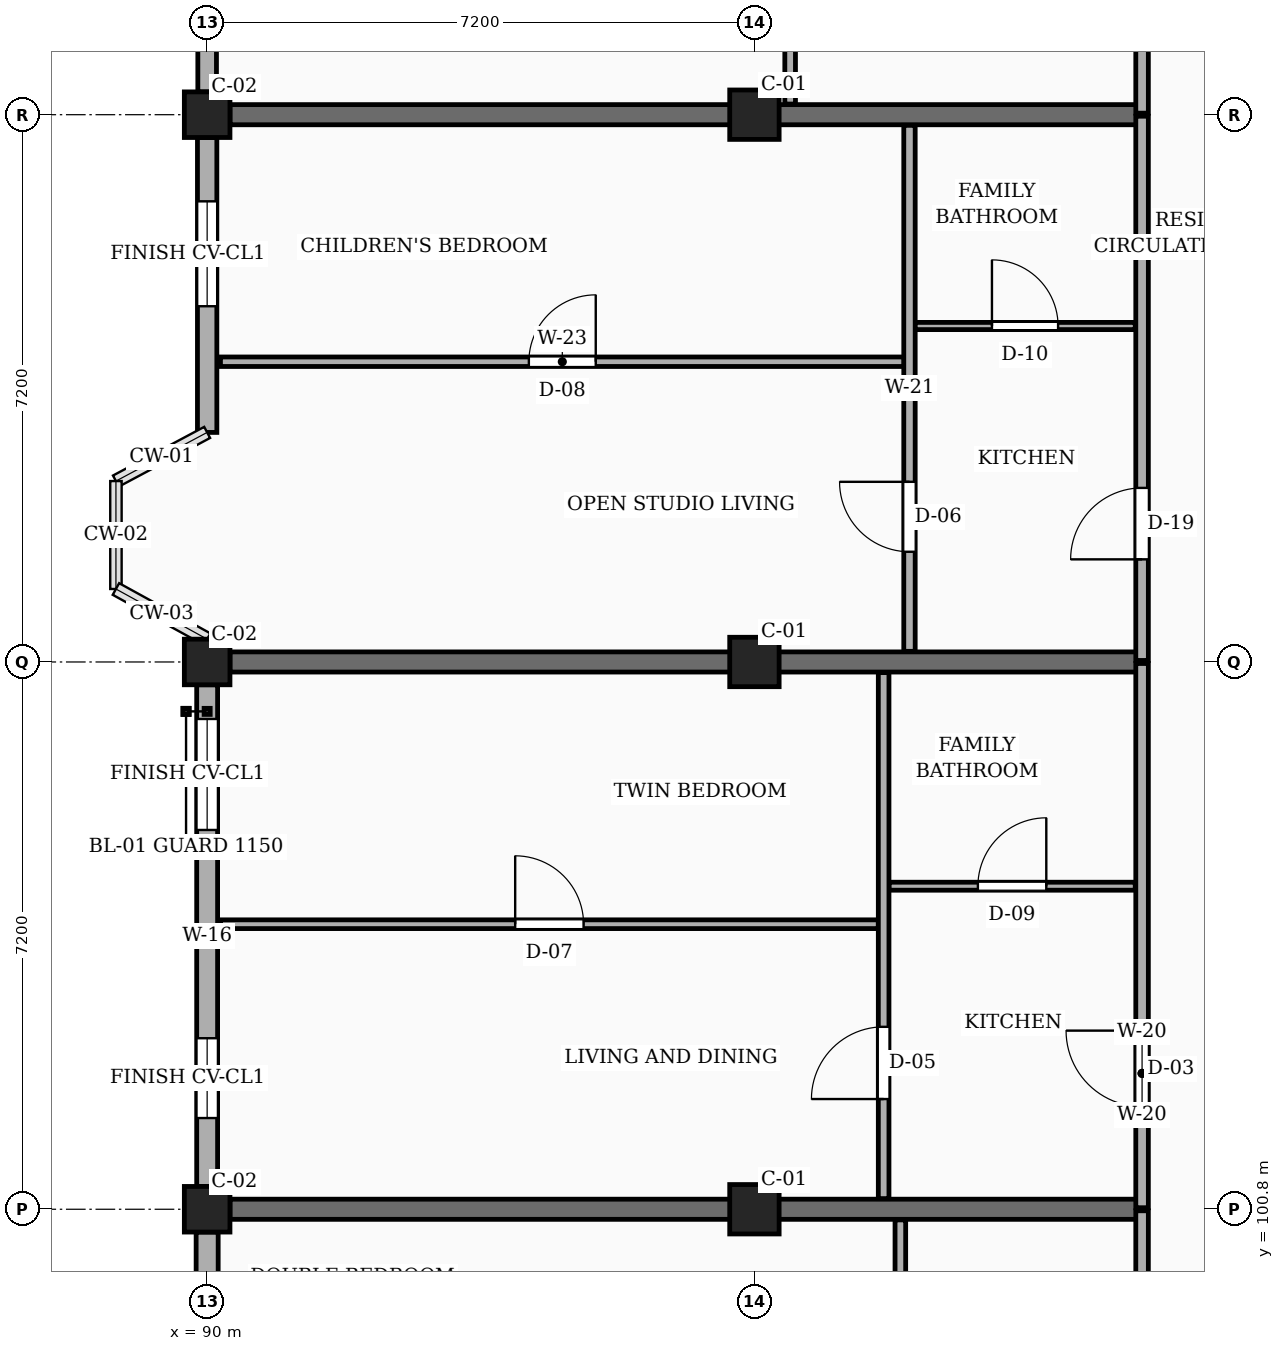
"""IFC4 building model, lengths in metres.
Left out: names, types, materials, properties, quantities, classifications, styles, units other than length and angle.
Written with IfcOpenShell. Run it as: python <this file> out.ifc"""

import sys

from ifc_helpers import new_model, si_unit, direction, frame, frame_2d, origin, origin_2d, place, context, subcontext, project, spatial, rectangle, extrude, element, fill, save


model = new_model("IFC4")
c1 = context("Model", 3, precision=1e-05, world=origin(), true_north=direction((0.0, 1.0)))
c2 = subcontext(c1, "Body", "Model", "MODEL_VIEW")
j1 = project(units=[si_unit("LENGTHUNIT", "METRE"), si_unit("PLANEANGLEUNIT", "RADIAN")], contexts=[c1])
p1 = place(None, origin())
s1 = spatial("IfcSite", under=j1, at=p1, CompositionType="ELEMENT")
p2 = place(p1, origin())
s2 = spatial("IfcBuilding", under=s1, at=p2, CompositionType="ELEMENT")
p3 = place(p2, frame((0.0, 0.0, 7.65)))
s3 = spatial("IfcBuildingStorey", under=s2, at=p3, CompositionType="ELEMENT", Elevation=7.65)
for number, where, z_axis, x_axis in (
    (1, (90.0, 100.8, 0.0), (0.0, 0.0, 1.0), (1.0, 0.0, 0.0)),
    (2, (90.0, 108.0, 0.0), (0.0, 0.0, 1.0), (1.0, 0.0, 0.0)),
    (3, (90.0, 115.2, 0.0), (0.0, 0.0, 1.0), (1.0, 0.0, 0.0)),
):
    element("IfcColumn", number, at=place(p3, frame(where, z_axis=z_axis, x_axis=x_axis)), inside=s3, PredefinedType="COLUMN", context=c2, shape_type="SweptSolid", body=[
        extrude(rectangle(XDim=0.6, YDim=0.6, at=origin_2d()), origin(), (0.0, 0.0, 1.0), 3.15),
    ])
for number, where, z_axis, x_axis in (
    (4, (97.2, 100.8, 0.0), (0.0, 0.0, 1.0), (1.0, 0.0, 0.0)),
    (5, (97.2, 108.0, 0.0), (0.0, 0.0, 1.0), (1.0, 0.0, 0.0)),
    (6, (97.2, 115.2, 0.0), (0.0, 0.0, 1.0), (1.0, 0.0, 0.0)),
):
    element("IfcColumn", number, at=place(p3, frame(where, z_axis=z_axis, x_axis=x_axis)), inside=s3, PredefinedType="COLUMN", context=c2, shape_type="SweptSolid", body=[
        extrude(rectangle(XDim=0.65, YDim=0.65, at=origin_2d()), origin(), (0.0, 0.0, 1.0), 3.15),
    ])
for number, where, z_axis, x_axis in (
    (7, (90.3, 100.8, 0.0), (0.0, 0.0, 1.0), (1.0, 0.0, 0.0)),
    (8, (90.3, 108.0, 0.0), (0.0, 0.0, 1.0), (1.0, 0.0, 0.0)),
    (9, (90.3, 115.2, 0.0), (0.0, 0.0, 1.0), (1.0, 0.0, 0.0)),
):
    element("IfcWall", number, at=place(p3, frame(where, z_axis=z_axis, x_axis=x_axis)), inside=s3, PredefinedType="SOLIDWALL", context=c2, shape_type="SweptSolid", body=[
        extrude(rectangle(XDim=12.0, YDim=0.265, at=frame_2d((6.0, 0.0))), origin(), (0.0, 0.0, 1.0), 2.19),
    ])
p4 = place(p3, frame((90.0, 122.1, 0.0), z_axis=(0.0, 0.0, 1.0), x_axis=(0.0, -1.0, 0.0)))
e10 = element("IfcWall", 10, at=p4, inside=s3, PredefinedType="SOLIDWALL", context=c2, shape_type="SweptSolid", body=[
    extrude(rectangle(XDim=6.6, YDim=0.245, at=frame_2d((3.3, 0.0))), origin(), (0.0, 0.0, 1.0), 2.46),
])
p5 = place(p4, frame((0.45, 0.0, 0.78)))
e11 = element("IfcOpeningElement", 11, at=p5, cuts=e10, PredefinedType="OPENING", context=c2, shape_type="SweptSolid", body=[
    extrude(rectangle(XDim=1.22, YDim=1.36, at=frame_2d((0.61, 0.68))), frame((0.0, 0.133, 0.0), z_axis=(0.0, -1.0, 0.0), x_axis=(1.0, 0.0, 0.0)), (0.0, 0.0, 1.0), 0.265),
])
p6 = place(p4, frame((4.65, 0.0, 0.78)))
e12 = element("IfcOpeningElement", 12, at=p6, cuts=e10, PredefinedType="OPENING", context=c2, shape_type="SweptSolid", body=[
    extrude(rectangle(XDim=1.38, YDim=1.36, at=frame_2d((0.69, 0.68))), frame((0.0, 0.133, 0.0), z_axis=(0.0, -1.0, 0.0), x_axis=(1.0, 0.0, 0.0)), (0.0, 0.0, 1.0), 0.265),
])
p7 = place(p3, frame((90.0, 114.9, 0.0), z_axis=(0.0, 0.0, 1.0), x_axis=(0.0, -1.0, 0.0)))
e13 = element("IfcWall", 13, at=p7, inside=s3, PredefinedType="SOLIDWALL", context=c2, shape_type="SweptSolid", body=[
    extrude(rectangle(XDim=3.88, YDim=0.255, at=frame_2d((1.94, 0.0))), origin(), (0.0, 0.0, 1.0), 2.46),
])
p8 = place(p7, frame((0.84, 0.0, 0.78)))
e14 = element("IfcOpeningElement", 14, at=p8, cuts=e13, PredefinedType="OPENING", context=c2, shape_type="SweptSolid", body=[
    extrude(rectangle(XDim=1.38, YDim=1.36, at=frame_2d((0.69, 0.68))), frame((0.0, 0.137, 0.0), z_axis=(0.0, -1.0, 0.0), x_axis=(1.0, 0.0, 0.0)), (0.0, 0.0, 1.0), 0.275),
])
p9 = place(p3, frame((90.0, 107.7, 0.0), z_axis=(0.0, 0.0, 1.0), x_axis=(0.0, -1.0, 0.0)))
e15 = element("IfcWall", 15, at=p9, inside=s3, PredefinedType="SOLIDWALL", context=c2, shape_type="SweptSolid", body=[
    extrude(rectangle(XDim=6.6, YDim=0.275, at=frame_2d((3.3, 0.0))), origin(), (0.0, 0.0, 1.0), 2.46),
])
p10 = place(p9, frame((0.45, 0.0, 0.78)))
e16 = element("IfcOpeningElement", 16, at=p10, cuts=e15, PredefinedType="OPENING", context=c2, shape_type="SweptSolid", body=[
    extrude(rectangle(XDim=1.46, YDim=1.36, at=frame_2d((0.73, 0.68))), frame((0.0, 0.147, 0.0), z_axis=(0.0, -1.0, 0.0), x_axis=(1.0, 0.0, 0.0)), (0.0, 0.0, 1.0), 0.295),
])
p11 = place(p9, frame((4.65, 0.0, 0.78)))
e17 = element("IfcOpeningElement", 17, at=p11, cuts=e15, PredefinedType="OPENING", context=c2, shape_type="SweptSolid", body=[
    extrude(rectangle(XDim=1.05, YDim=1.44, at=frame_2d((0.525, 0.72))), frame((0.0, 0.147, 0.0), z_axis=(0.0, -1.0, 0.0), x_axis=(1.0, 0.0, 0.0)), (0.0, 0.0, 1.0), 0.295),
])
p12 = place(p3, frame((90.0, 100.5, 0.0), z_axis=(0.0, 0.0, 1.0), x_axis=(0.0, -1.0, 0.0)))
e18 = element("IfcWall", 18, at=p12, inside=s3, PredefinedType="SOLIDWALL", context=c2, shape_type="SweptSolid", body=[
    extrude(rectangle(XDim=3.88, YDim=0.29, at=frame_2d((1.94, 0.0))), origin(), (0.0, 0.0, 1.0), 2.46),
])
p13 = place(p12, frame((0.955, 0.0, 0.78)))
e19 = element("IfcOpeningElement", 19, at=p13, cuts=e18, PredefinedType="OPENING", context=c2, shape_type="SweptSolid", body=[
    extrude(rectangle(XDim=1.05, YDim=1.44, at=frame_2d((0.525, 0.72))), frame((0.0, 0.155, 0.0), z_axis=(0.0, -1.0, 0.0), x_axis=(1.0, 0.0, 0.0)), (0.0, 0.0, 1.0), 0.31),
])
p14 = place(p3, frame((102.3, 93.62, 0.0), z_axis=(0.0, 0.0, 1.0), x_axis=(0.0, 1.0, 0.0)))
e20 = element("IfcWall", 20, at=p14, inside=s3, PredefinedType="PARTITIONING", context=c2, shape_type="SweptSolid", body=[
    extrude(rectangle(XDim=7.16, YDim=0.165, at=frame_2d((3.58, 0.0))), origin(), (0.0, 0.0, 1.0), 2.325),
])
p15 = place(p14, frame((1.33, 0.0, 0.0)))
e21 = element("IfcOpeningElement", 21, at=p15, cuts=e20, PredefinedType="OPENING", context=c2, shape_type="SweptSolid", body=[
    extrude(rectangle(XDim=1.14, YDim=2.18, at=frame_2d((0.57, 1.09))), frame((0.0, 0.093, 0.0), z_axis=(0.0, -1.0, 0.0), x_axis=(1.0, 0.0, 0.0)), (0.0, 0.0, 1.0), 0.185),
])
p16 = place(p3, frame((102.3, 100.82, 0.0), z_axis=(0.0, 0.0, 1.0), x_axis=(0.0, 1.0, 0.0)))
e22 = element("IfcWall", 22, at=p16, inside=s3, PredefinedType="PARTITIONING", context=c2, shape_type="SweptSolid", body=[
    extrude(rectangle(XDim=7.16, YDim=0.165, at=frame_2d((3.58, 0.0))), origin(), (0.0, 0.0, 1.0), 2.325),
])
p17 = place(p16, frame((1.33, 0.0, 0.0)))
e23 = element("IfcOpeningElement", 23, at=p17, cuts=e22, PredefinedType="OPENING", context=c2, shape_type="SweptSolid", body=[
    extrude(rectangle(XDim=1.0, YDim=2.15, at=frame_2d((0.5, 1.075))), frame((0.0, 0.093, 0.0), z_axis=(0.0, -1.0, 0.0), x_axis=(1.0, 0.0, 0.0)), (0.0, 0.0, 1.0), 0.185),
])
p18 = place(p3, frame((102.3, 108.02, 0.0), z_axis=(0.0, 0.0, 1.0), x_axis=(0.0, 1.0, 0.0)))
e24 = element("IfcWall", 24, at=p18, inside=s3, PredefinedType="PARTITIONING", context=c2, shape_type="SweptSolid", body=[
    extrude(rectangle(XDim=7.16, YDim=0.165, at=frame_2d((3.58, 0.0))), origin(), (0.0, 0.0, 1.0), 2.325),
])
p19 = place(p18, frame((1.33, 0.0, 0.0)))
e25 = element("IfcOpeningElement", 25, at=p19, cuts=e24, PredefinedType="OPENING", context=c2, shape_type="SweptSolid", body=[
    extrude(rectangle(XDim=0.94, YDim=2.12, at=frame_2d((0.47, 1.06))), frame((0.0, 0.093, 0.0), z_axis=(0.0, -1.0, 0.0), x_axis=(1.0, 0.0, 0.0)), (0.0, 0.0, 1.0), 0.185),
])
p20 = place(p3, frame((102.3, 115.22, 0.0), z_axis=(0.0, 0.0, 1.0), x_axis=(0.0, 1.0, 0.0)))
e26 = element("IfcWall", 26, at=p20, inside=s3, PredefinedType="PARTITIONING", context=c2, shape_type="SweptSolid", body=[
    extrude(rectangle(XDim=7.16, YDim=0.165, at=frame_2d((3.58, 0.0))), origin(), (0.0, 0.0, 1.0), 2.325),
])
p21 = place(p20, frame((4.78, 0.0, 0.0)))
e27 = element("IfcOpeningElement", 27, at=p21, cuts=e26, PredefinedType="OPENING", context=c2, shape_type="SweptSolid", body=[
    extrude(rectangle(XDim=1.14, YDim=2.18, at=frame_2d((0.57, 1.09))), frame((0.0, 0.093, 0.0), z_axis=(0.0, -1.0, 0.0), x_axis=(1.0, 0.0, 0.0)), (0.0, 0.0, 1.0), 0.185),
])
p22 = place(p3, frame((99.12, 93.74, 0.0), z_axis=(0.0, 0.0, 1.0), x_axis=(0.0, 1.0, 0.0)))
e28 = element("IfcWall", 28, at=p22, inside=s3, PredefinedType="PARTITIONING", context=c2, shape_type="SweptSolid", body=[
    extrude(rectangle(XDim=6.92, YDim=0.14, at=frame_2d((3.46, 0.0))), origin(), (0.0, 0.0, 1.0), 2.325),
])
p23 = place(p22, frame((1.31, 0.0, 0.0)))
e29 = element("IfcOpeningElement", 29, at=p23, cuts=e28, PredefinedType="OPENING", context=c2, shape_type="SweptSolid", body=[
    extrude(rectangle(XDim=0.92, YDim=2.1, at=frame_2d((0.46, 1.05))), frame((0.0, 0.08, 0.0), z_axis=(0.0, -1.0, 0.0), x_axis=(1.0, 0.0, 0.0)), (0.0, 0.0, 1.0), 0.16),
])
p24 = place(p3, frame((90.175, 104.55, 0.0), z_axis=(0.0, 0.0, 1.0), x_axis=(1.0, 0.0, 0.0)))
e30 = element("IfcWall", 30, at=p24, inside=s3, PredefinedType="PARTITIONING", context=c2, shape_type="SweptSolid", body=[
    extrude(rectangle(XDim=8.655, YDim=0.115, at=frame_2d((4.328, 0.0))), origin(), (0.0, 0.0, 1.0), 2.325),
])
p25 = place(p24, frame((3.877, 0.0, 0.0)))
e31 = element("IfcOpeningElement", 31, at=p25, cuts=e30, PredefinedType="OPENING", context=c2, shape_type="SweptSolid", body=[
    extrude(rectangle(XDim=0.9, YDim=2.1, at=frame_2d((0.45, 1.05))), frame((0.0, 0.067, 0.0), z_axis=(0.0, -1.0, 0.0), x_axis=(1.0, 0.0, 0.0)), (0.0, 0.0, 1.0), 0.135),
])
p26 = place(p3, frame((98.97, 105.05, 0.0), z_axis=(0.0, 0.0, 1.0), x_axis=(1.0, 0.0, 0.0)))
e32 = element("IfcWall", 32, at=p26, inside=s3, PredefinedType="PARTITIONING", context=c2, shape_type="SweptSolid", body=[
    extrude(rectangle(XDim=3.24, YDim=0.105, at=frame_2d((1.62, 0.0))), origin(), (0.0, 0.0, 1.0), 2.325),
])
p27 = place(p26, frame((1.17, 0.0, 0.0)))
e33 = element("IfcOpeningElement", 33, at=p27, cuts=e32, PredefinedType="OPENING", context=c2, shape_type="SweptSolid", body=[
    extrude(rectangle(XDim=0.9, YDim=2.05, at=frame_2d((0.45, 1.025))), frame((0.0, 0.062, 0.0), z_axis=(0.0, -1.0, 0.0), x_axis=(1.0, 0.0, 0.0)), (0.0, 0.0, 1.0), 0.125),
])
p28 = place(p3, frame((98.9, 100.94, 0.0), z_axis=(0.0, 0.0, 1.0), x_axis=(0.0, 1.0, 0.0)))
e34 = element("IfcWall", 34, at=p28, inside=s3, PredefinedType="PARTITIONING", context=c2, shape_type="SweptSolid", body=[
    extrude(rectangle(XDim=6.92, YDim=0.14, at=frame_2d((3.46, 0.0))), origin(), (0.0, 0.0, 1.0), 2.325),
])
p29 = place(p28, frame((1.31, 0.0, 0.0)))
e35 = element("IfcOpeningElement", 35, at=p29, cuts=e34, PredefinedType="OPENING", context=c2, shape_type="SweptSolid", body=[
    extrude(rectangle(XDim=0.95, YDim=2.1, at=frame_2d((0.475, 1.05))), frame((0.0, 0.08, 0.0), z_axis=(0.0, -1.0, 0.0), x_axis=(1.0, 0.0, 0.0)), (0.0, 0.0, 1.0), 0.16),
])
p30 = place(p3, frame((90.175, 111.95, 0.0), z_axis=(0.0, 0.0, 1.0), x_axis=(1.0, 0.0, 0.0)))
e36 = element("IfcWall", 36, at=p30, inside=s3, PredefinedType="PARTITIONING", context=c2, shape_type="SweptSolid", body=[
    extrude(rectangle(XDim=8.995, YDim=0.125, at=frame_2d((4.498, 0.0))), origin(), (0.0, 0.0, 1.0), 2.325),
])
p31 = place(p30, frame((4.058, 0.0, 0.0)))
e37 = element("IfcOpeningElement", 37, at=p31, cuts=e36, PredefinedType="OPENING", context=c2, shape_type="SweptSolid", body=[
    extrude(rectangle(XDim=0.88, YDim=2.08, at=frame_2d((0.44, 1.04))), frame((0.0, 0.073, 0.0), z_axis=(0.0, -1.0, 0.0), x_axis=(1.0, 0.0, 0.0)), (0.0, 0.0, 1.0), 0.145),
])
p32 = place(p3, frame((99.31, 112.42, 0.0), z_axis=(0.0, 0.0, 1.0), x_axis=(1.0, 0.0, 0.0)))
e38 = element("IfcWall", 38, at=p32, inside=s3, PredefinedType="PARTITIONING", context=c2, shape_type="SweptSolid", body=[
    extrude(rectangle(XDim=2.9, YDim=0.095, at=frame_2d((1.45, 0.0))), origin(), (0.0, 0.0, 1.0), 2.325),
])
p33 = place(p32, frame((1.015, 0.0, 0.0)))
e39 = element("IfcOpeningElement", 39, at=p33, cuts=e38, PredefinedType="OPENING", context=c2, shape_type="SweptSolid", body=[
    extrude(rectangle(XDim=0.87, YDim=2.05, at=frame_2d((0.435, 1.025))), frame((0.0, 0.058, 0.0), z_axis=(0.0, -1.0, 0.0), x_axis=(1.0, 0.0, 0.0)), (0.0, 0.0, 1.0), 0.115),
])
p34 = place(p3, frame((99.24, 108.14, 0.0), z_axis=(0.0, 0.0, 1.0), x_axis=(0.0, 1.0, 0.0)))
e40 = element("IfcWall", 40, at=p34, inside=s3, PredefinedType="PARTITIONING", context=c2, shape_type="SweptSolid", body=[
    extrude(rectangle(XDim=6.92, YDim=0.15, at=frame_2d((3.46, 0.0))), origin(), (0.0, 0.0, 1.0), 2.325),
])
p35 = place(p34, frame((1.31, 0.0, 0.0)))
e41 = element("IfcOpeningElement", 41, at=p35, cuts=e40, PredefinedType="OPENING", context=c2, shape_type="SweptSolid", body=[
    extrude(rectangle(XDim=0.92, YDim=2.1, at=frame_2d((0.46, 1.05))), frame((0.0, 0.085, 0.0), z_axis=(0.0, -1.0, 0.0), x_axis=(1.0, 0.0, 0.0)), (0.0, 0.0, 1.0), 0.17),
])
p36 = place(p3, frame((97.67, 115.34, 0.0), z_axis=(0.0, 0.0, 1.0), x_axis=(0.0, 1.0, 0.0)))
e42 = element("IfcWall", 42, at=p36, inside=s3, PredefinedType="PARTITIONING", context=c2, shape_type="SweptSolid", body=[
    extrude(rectangle(XDim=6.92, YDim=0.14, at=frame_2d((3.46, 0.0))), origin(), (0.0, 0.0, 1.0), 2.325),
])
p37 = place(p36, frame((4.66, 0.0, 0.0)))
e43 = element("IfcOpeningElement", 43, at=p37, cuts=e42, PredefinedType="OPENING", context=c2, shape_type="SweptSolid", body=[
    extrude(rectangle(XDim=0.95, YDim=2.1, at=frame_2d((0.475, 1.05))), frame((0.0, 0.08, 0.0), z_axis=(0.0, -1.0, 0.0), x_axis=(1.0, 0.0, 0.0)), (0.0, 0.0, 1.0), 0.16),
])
p38 = place(p8, origin())
e44 = element("IfcWindow", 44, at=p38, inside=s3, PartitioningType="SINGLE_PANEL", PredefinedType="WINDOW", context=c2, shape_type="SweptSolid", body=[
    extrude(rectangle(XDim=1.38, YDim=1.36, at=frame_2d((0.69, 0.68))), frame((0.0, 0.03, 0.0), z_axis=(0.0, -1.0, 0.0), x_axis=(1.0, 0.0, 0.0)), (0.0, 0.0, 1.0), 0.06),
])
fill(e14, e44)
p39 = place(p10, origin())
e45 = element("IfcWindow", 45, at=p39, inside=s3, PartitioningType="SINGLE_PANEL", PredefinedType="WINDOW", context=c2, shape_type="SweptSolid", body=[
    extrude(rectangle(XDim=1.46, YDim=1.36, at=frame_2d((0.73, 0.68))), frame((0.0, 0.03, 0.0), z_axis=(0.0, -1.0, 0.0), x_axis=(1.0, 0.0, 0.0)), (0.0, 0.0, 1.0), 0.06),
])
fill(e16, e45)
p40 = place(p11, origin())
e46 = element("IfcWindow", 46, at=p40, inside=s3, PartitioningType="SINGLE_PANEL", PredefinedType="WINDOW", context=c2, shape_type="SweptSolid", body=[
    extrude(rectangle(XDim=1.05, YDim=1.44, at=frame_2d((0.525, 0.72))), frame((0.0, 0.03, 0.0), z_axis=(0.0, -1.0, 0.0), x_axis=(1.0, 0.0, 0.0)), (0.0, 0.0, 1.0), 0.06),
])
fill(e17, e46)
p41 = place(p17, origin())
e47 = element("IfcDoor", 47, at=p41, inside=s3, OperationType="SINGLE_SWING_RIGHT", PredefinedType="DOOR", context=c2, shape_type="SweptSolid", body=[
    extrude(rectangle(XDim=1.0, YDim=2.15, at=frame_2d((0.5, 1.075))), frame((0.0, 0.025, 0.0), z_axis=(0.0, -1.0, 0.0), x_axis=(1.0, 0.0, 0.0)), (0.0, 0.0, 1.0), 0.05),
])
fill(e23, e47)
p42 = place(p19, origin())
e48 = element("IfcDoor", 48, at=p42, inside=s3, OperationType="SINGLE_SWING_LEFT", PredefinedType="DOOR", context=c2, shape_type="SweptSolid", body=[
    extrude(rectangle(XDim=0.94, YDim=2.12, at=frame_2d((0.47, 1.06))), frame((0.0, 0.025, 0.0), z_axis=(0.0, -1.0, 0.0), x_axis=(1.0, 0.0, 0.0)), (0.0, 0.0, 1.0), 0.05),
])
fill(e25, e48)
p43 = place(p25, origin())
e49 = element("IfcDoor", 49, at=p43, inside=s3, OperationType="SINGLE_SWING_LEFT", PredefinedType="DOOR", context=c2, shape_type="SweptSolid", body=[
    extrude(rectangle(XDim=0.9, YDim=2.1, at=frame_2d((0.45, 1.05))), frame((0.0, 0.025, 0.0), z_axis=(0.0, -1.0, 0.0), x_axis=(1.0, 0.0, 0.0)), (0.0, 0.0, 1.0), 0.05),
])
fill(e31, e49)
p44 = place(p27, origin())
e50 = element("IfcDoor", 50, at=p44, inside=s3, OperationType="SINGLE_SWING_RIGHT", PredefinedType="DOOR", context=c2, shape_type="SweptSolid", body=[
    extrude(rectangle(XDim=0.9, YDim=2.05, at=frame_2d((0.45, 1.025))), frame((0.0, 0.025, 0.0), z_axis=(0.0, -1.0, 0.0), x_axis=(1.0, 0.0, 0.0)), (0.0, 0.0, 1.0), 0.05),
])
fill(e33, e50)
p45 = place(p29, origin())
e51 = element("IfcDoor", 51, at=p45, inside=s3, OperationType="SINGLE_SWING_LEFT", PredefinedType="DOOR", context=c2, shape_type="SweptSolid", body=[
    extrude(rectangle(XDim=0.95, YDim=2.1, at=frame_2d((0.475, 1.05))), frame((0.0, 0.025, 0.0), z_axis=(0.0, -1.0, 0.0), x_axis=(1.0, 0.0, 0.0)), (0.0, 0.0, 1.0), 0.05),
])
fill(e35, e51)
p46 = place(p31, origin())
e52 = element("IfcDoor", 52, at=p46, inside=s3, OperationType="SINGLE_SWING_RIGHT", PredefinedType="DOOR", context=c2, shape_type="SweptSolid", body=[
    extrude(rectangle(XDim=0.88, YDim=2.08, at=frame_2d((0.44, 1.04))), frame((0.0, 0.025, 0.0), z_axis=(0.0, -1.0, 0.0), x_axis=(1.0, 0.0, 0.0)), (0.0, 0.0, 1.0), 0.05),
])
fill(e37, e52)
p47 = place(p33, origin())
e53 = element("IfcDoor", 53, at=p47, inside=s3, OperationType="SINGLE_SWING_LEFT", PredefinedType="DOOR", context=c2, shape_type="SweptSolid", body=[
    extrude(rectangle(XDim=0.87, YDim=2.05, at=frame_2d((0.435, 1.025))), frame((0.0, 0.025, 0.0), z_axis=(0.0, -1.0, 0.0), x_axis=(1.0, 0.0, 0.0)), (0.0, 0.0, 1.0), 0.05),
])
fill(e39, e53)
p48 = place(p35, origin())
e54 = element("IfcDoor", 54, at=p48, inside=s3, OperationType="SINGLE_SWING_RIGHT", PredefinedType="DOOR", context=c2, shape_type="SweptSolid", body=[
    extrude(rectangle(XDim=0.92, YDim=2.1, at=frame_2d((0.46, 1.05))), frame((0.0, 0.025, 0.0), z_axis=(0.0, -1.0, 0.0), x_axis=(1.0, 0.0, 0.0)), (0.0, 0.0, 1.0), 0.05),
])
fill(e41, e54)
save(model, sys.argv[1])
